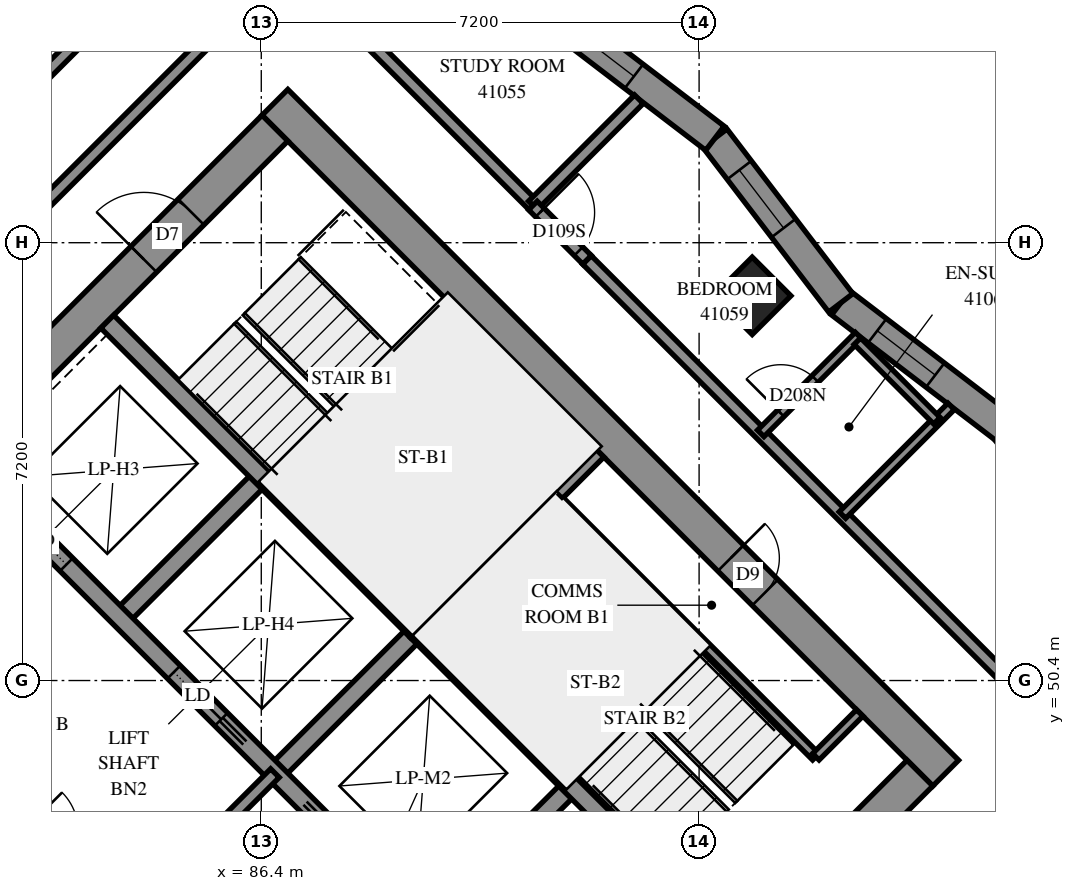
"""IFC4 building model, lengths in metres.
Left out: names, types, materials, properties, quantities, classifications, styles, units other than length and angle.
Written with IfcOpenShell. Run it as: python <this file> out.ifc"""

import sys

from ifc_helpers import new_model, si_unit, direction, frame, frame_2d, origin, origin_2d, place, context, subcontext, project, spatial, polyline, rectangle, outline, extrude, element, fill, save


model = new_model("IFC4")
c1 = context("Model", 3, precision=1e-05, world=origin(), true_north=direction((0.0, 1.0)))
c2 = subcontext(c1, "Body", "Model", "MODEL_VIEW")
j1 = project(units=[si_unit("LENGTHUNIT", "METRE"), si_unit("PLANEANGLEUNIT", "RADIAN")], contexts=[c1])
p1 = place(None, origin())
s1 = spatial("IfcSite", under=j1, at=p1, CompositionType="ELEMENT")
p2 = place(p1, origin())
s2 = spatial("IfcBuilding", under=s1, at=p2, CompositionType="ELEMENT")
p3 = place(p2, frame((0.0, 0.0, 152.4)))
s3 = spatial("IfcBuildingStorey", under=s2, at=p3, CompositionType="ELEMENT", Elevation=152.4)
p4 = place(p3, frame((94.474, 56.727, 0.0), z_axis=(0.0, 0.0, 1.0), x_axis=(0.7071067812, -0.7071067812, 0.0)))
e1 = element("IfcColumn", 1, at=p4, inside=s3, PredefinedType="COLUMN", context=c2, shape_type="SweptSolid", body=[
    extrude(rectangle(XDim=0.9, YDim=0.9, at=origin_2d()), origin(), (0.0, 0.0, 1.0), 3.1),
])
p5 = place(p3, frame((76.018, 49.302, -0.3), z_axis=(0.0, 0.0, 1.0), x_axis=(0.7071067812, -0.7071067812, 0.0)))
e2 = element("IfcWall", 2, at=p5, inside=s3, PredefinedType="SHEAR", context=c2, shape_type="SweptSolid", body=[
    extrude(rectangle(XDim=15.6, YDim=0.6, at=frame_2d((7.8, 0.0))), origin(), (0.0, 0.0, 1.0), 2.7),
])
p6 = place(p3, frame((86.625, 59.908, -0.3), z_axis=(0.0, 0.0, 1.0), x_axis=(0.7071067812, -0.7071067812, 0.0)))
e3 = element("IfcWall", 3, at=p6, inside=s3, PredefinedType="SHEAR", context=c2, shape_type="SweptSolid", body=[
    extrude(rectangle(XDim=15.6, YDim=0.6, at=frame_2d((7.8, 0.0))), origin(), (0.0, 0.0, 1.0), 2.7),
])
p7 = place(p6, frame((10.6, 0.0, 0.3)))
e4 = element("IfcOpeningElement", 4, at=p7, cuts=e3, PredefinedType="OPENING", context=c2, shape_type="SweptSolid", body=[
    extrude(rectangle(XDim=0.8, YDim=2.1, at=frame_2d((0.4, 1.05))), frame((0.0, 0.31, 0.0), z_axis=(0.0, -1.0, 0.0), x_axis=(1.0, 0.0, 0.0)), (0.0, 0.0, 1.0), 0.62),
])
p8 = place(p3, frame((76.442, 49.302, -0.3), z_axis=(0.0, 0.0, 1.0), x_axis=(0.7071067812, 0.7071067812, 0.0)))
e5 = element("IfcWall", 5, at=p8, inside=s3, PredefinedType="SHEAR", context=c2, shape_type="SweptSolid", body=[
    extrude(rectangle(XDim=14.4, YDim=0.6, at=frame_2d((7.2, 0.0))), origin(), (0.0, 0.0, 1.0), 2.7),
])
p9 = place(p8, frame((4.55, 0.0, 0.3)))
e6 = element("IfcOpeningElement", 6, at=p9, cuts=e5, PredefinedType="OPENING", context=c2, shape_type="SweptSolid", body=[
    extrude(rectangle(XDim=1.1, YDim=2.1, at=frame_2d((0.55, 1.05))), frame((0.0, 0.31, 0.0), z_axis=(0.0, -1.0, 0.0), x_axis=(1.0, 0.0, 0.0)), (0.0, 0.0, 1.0), 0.62),
])
p10 = place(p8, frame((11.35, 0.0, 0.3)))
e7 = element("IfcOpeningElement", 7, at=p10, cuts=e5, PredefinedType="OPENING", context=c2, shape_type="SweptSolid", body=[
    extrude(rectangle(XDim=1.1, YDim=2.1, at=frame_2d((0.55, 1.05))), frame((0.0, 0.31, 0.0), z_axis=(0.0, -1.0, 0.0), x_axis=(1.0, 0.0, 0.0)), (0.0, 0.0, 1.0), 0.62),
])
p11 = place(p3, frame((87.049, 38.695, -0.3), z_axis=(0.0, 0.0, 1.0), x_axis=(0.7071067812, 0.7071067812, 0.0)))
e8 = element("IfcWall", 8, at=p11, inside=s3, PredefinedType="SHEAR", context=c2, shape_type="SweptSolid", body=[
    extrude(rectangle(XDim=14.4, YDim=0.6, at=frame_2d((7.2, 0.0))), origin(), (0.0, 0.0, 1.0), 2.7),
])
p12 = place(p11, frame((4.55, 0.0, 0.3)))
e9 = element("IfcOpeningElement", 9, at=p12, cuts=e8, PredefinedType="OPENING", context=c2, shape_type="SweptSolid", body=[
    extrude(rectangle(XDim=1.1, YDim=2.1, at=frame_2d((0.55, 1.05))), frame((0.0, 0.31, 0.0), z_axis=(0.0, -1.0, 0.0), x_axis=(1.0, 0.0, 0.0)), (0.0, 0.0, 1.0), 0.62),
])
p13 = place(p11, frame((11.35, 0.0, 0.3)))
e10 = element("IfcOpeningElement", 10, at=p13, cuts=e8, PredefinedType="OPENING", context=c2, shape_type="SweptSolid", body=[
    extrude(rectangle(XDim=1.1, YDim=2.1, at=frame_2d((0.55, 1.05))), frame((0.0, 0.31, 0.0), z_axis=(0.0, -1.0, 0.0), x_axis=(1.0, 0.0, 0.0)), (0.0, 0.0, 1.0), 0.62),
])
p14 = place(p3, frame((84.079, 51.423, 0.0), z_axis=(0.0, 0.0, 1.0), x_axis=(0.7071219326, 0.7070916295, 0.0)))
e11 = element("IfcWall", 11, at=p14, inside=s3, PredefinedType="SOLIDWALL", context=c2, shape_type="SweptSolid", body=[
    extrude(rectangle(XDim=3.3, YDim=0.3, at=frame_2d((1.65, 0.0))), origin(), (0.0, 0.0, 1.0), 3.1),
])
for number, where, z_axis, x_axis in (
    (12, (86.625, 48.878, 0.0), (0.0, 0.0, 1.0), (0.707, 0.707, 0.0)),
    (13, (89.17, 46.332, 0.0), (0.0, 0.0, 1.0), (0.707, 0.707, 0.0)),
):
    element("IfcWall", number, at=place(p3, frame(where, z_axis=z_axis, x_axis=x_axis)), inside=s3, PredefinedType="SOLIDWALL", context=c2, shape_type="SweptSolid", body=[
        extrude(rectangle(XDim=3.3, YDim=0.3, at=frame_2d((1.65, 0.0))), origin(), (0.0, 0.0, 1.0), 3.1),
    ])
p15 = place(p3, frame((78.988, 51.423, 0.0), z_axis=(0.0, 0.0, 1.0), x_axis=(0.7071067812, -0.7071067812, 0.0)))
e14 = element("IfcWall", 14, at=p15, inside=s3, PredefinedType="SOLIDWALL", context=c2, shape_type="SweptSolid", body=[
    extrude(rectangle(XDim=14.4, YDim=0.3, at=frame_2d((7.2, 0.0))), origin(), (0.0, 0.0, 1.0), 3.1),
])
p16 = place(p15, frame((1.35, 0.0, 0.0)))
e15 = element("IfcOpeningElement", 15, at=p16, cuts=e14, PredefinedType="OPENING", context=c2, shape_type="SweptSolid", body=[
    extrude(rectangle(XDim=0.9, YDim=2.1, at=frame_2d((0.45, 1.05))), frame((0.0, 0.16, 0.0), z_axis=(0.0, -1.0, 0.0), x_axis=(1.0, 0.0, 0.0)), (0.0, 0.0, 1.0), 0.32),
])
p17 = place(p15, frame((4.95, 0.0, 0.0)))
e16 = element("IfcOpeningElement", 16, at=p17, cuts=e14, PredefinedType="OPENING", context=c2, shape_type="SweptSolid", body=[
    extrude(rectangle(XDim=0.9, YDim=2.1, at=frame_2d((0.45, 1.05))), frame((0.0, 0.16, 0.0), z_axis=(0.0, -1.0, 0.0), x_axis=(1.0, 0.0, 0.0)), (0.0, 0.0, 1.0), 0.32),
])
p18 = place(p15, frame((8.55, 0.0, 0.0)))
e17 = element("IfcOpeningElement", 17, at=p18, cuts=e14, PredefinedType="OPENING", context=c2, shape_type="SweptSolid", body=[
    extrude(rectangle(XDim=0.9, YDim=2.1, at=frame_2d((0.45, 1.05))), frame((0.0, 0.16, 0.0), z_axis=(0.0, -1.0, 0.0), x_axis=(1.0, 0.0, 0.0)), (0.0, 0.0, 1.0), 0.32),
])
p19 = place(p15, frame((12.05, 0.0, 0.0)))
e18 = element("IfcOpeningElement", 18, at=p19, cuts=e14, PredefinedType="OPENING", context=c2, shape_type="SweptSolid", body=[
    extrude(rectangle(XDim=1.1, YDim=2.1, at=frame_2d((0.55, 1.05))), frame((0.0, 0.16, 0.0), z_axis=(0.0, -1.0, 0.0), x_axis=(1.0, 0.0, 0.0)), (0.0, 0.0, 1.0), 0.32),
])
p20 = place(p3, frame((81.534, 53.969, 0.0), z_axis=(0.0, 0.0, 1.0), x_axis=(0.707103309, -0.7071102534, 0.0)))
e19 = element("IfcWall", 19, at=p20, inside=s3, PredefinedType="SOLIDWALL", context=c2, shape_type="SweptSolid", body=[
    extrude(rectangle(XDim=14.4, YDim=0.3, at=frame_2d((7.2, 0.0))), origin(), (0.0, 0.0, 1.0), 3.1),
])
p21 = place(p20, frame((1.25, 0.0, 0.0)))
e20 = element("IfcOpeningElement", 20, at=p21, cuts=e19, PredefinedType="OPENING", context=c2, shape_type="SweptSolid", body=[
    extrude(rectangle(XDim=1.1, YDim=2.1, at=frame_2d((0.55, 1.05))), frame((0.0, 0.16, 0.0), z_axis=(0.0, -1.0, 0.0), x_axis=(1.0, 0.0, 0.0)), (0.0, 0.0, 1.0), 0.32),
])
p22 = place(p20, frame((4.85, 0.0, 0.0)))
e21 = element("IfcOpeningElement", 21, at=p22, cuts=e19, PredefinedType="OPENING", context=c2, shape_type="SweptSolid", body=[
    extrude(rectangle(XDim=1.1, YDim=2.1, at=frame_2d((0.55, 1.05))), frame((0.0, 0.16, 0.0), z_axis=(0.0, -1.0, 0.0), x_axis=(1.0, 0.0, 0.0)), (0.0, 0.0, 1.0), 0.32),
])
p23 = place(p20, frame((8.45, 0.0, 0.0)))
e22 = element("IfcOpeningElement", 22, at=p23, cuts=e19, PredefinedType="OPENING", context=c2, shape_type="SweptSolid", body=[
    extrude(rectangle(XDim=1.1, YDim=2.1, at=frame_2d((0.55, 1.05))), frame((0.0, 0.16, 0.0), z_axis=(0.0, -1.0, 0.0), x_axis=(1.0, 0.0, 0.0)), (0.0, 0.0, 1.0), 0.32),
])
p24 = place(p20, frame((12.05, 0.0, 0.0)))
e23 = element("IfcOpeningElement", 23, at=p24, cuts=e19, PredefinedType="OPENING", context=c2, shape_type="SweptSolid", body=[
    extrude(rectangle(XDim=1.1, YDim=2.1, at=frame_2d((0.55, 1.05))), frame((0.0, 0.16, 0.0), z_axis=(0.0, -1.0, 0.0), x_axis=(1.0, 0.0, 0.0)), (0.0, 0.0, 1.0), 0.32),
])
for number, where, z_axis, x_axis in (
    (24, (83.867, 56.302, 0.0), (0.0, 0.0, 1.0), (0.707, -0.707, 0.0)),
    (25, (88.958, 51.211, 0.0), (0.0, 0.0, 1.0), (0.707, -0.707, 0.0)),
):
    element("IfcWall", number, at=place(p3, frame(where, z_axis=z_axis, x_axis=x_axis)), inside=s3, PredefinedType="SOLIDWALL", context=c2, shape_type="SweptSolid", body=[
        extrude(rectangle(XDim=7.2, YDim=0.3, at=frame_2d((3.6, 0.0))), origin(), (0.0, 0.0, 1.0), 3.1),
    ])
p25 = place(p3, frame((88.958, 51.211, 0.0), z_axis=(0.0, 0.0, 1.0), x_axis=(0.7071067812, 0.7071067812, 0.0)))
e26 = element("IfcWall", 26, at=p25, inside=s3, PredefinedType="SOLIDWALL", context=c2, shape_type="SweptSolid", body=[
    extrude(rectangle(XDim=4.2, YDim=0.3, at=frame_2d((2.1, 0.0))), origin(), (0.0, 0.0, 1.0), 3.1),
])
p26 = place(p3, frame((100.707, 51.834, 0.0), z_axis=(0.0, 0.0, 1.0), x_axis=(-0.6073041389, 0.7944694348, 0.0)))
e27 = element("IfcWall", 27, at=p26, inside=s3, PredefinedType="SOLIDWALL", context=c2, shape_type="SweptSolid", body=[
    extrude(outline(polyline([(0.033, -0.25), (3.441, -0.25), (3.374, 0.25), (-0.033, 0.25), (0.033, -0.25)])), origin(), (0.0, 0.0, 1.0), 3.1),
])
p27 = place(p26, frame((1.324, 0.0, 0.45)))
e28 = element("IfcOpeningElement", 28, at=p27, cuts=e27, PredefinedType="OPENING", context=c2, shape_type="SweptSolid", body=[
    extrude(rectangle(XDim=1.2, YDim=2.5, at=frame_2d((0.6, 1.25))), frame((0.0, 0.26, 0.0), z_axis=(0.0, -1.0, 0.0), x_axis=(1.0, 0.0, 0.0)), (0.0, 0.0, 1.0), 0.52),
])
p28 = place(p3, frame((98.637, 54.541, 0.0), z_axis=(0.0, 0.0, 1.0), x_axis=(-0.7944694348, 0.6073041389, 0.0)))
e29 = element("IfcWall", 29, at=p28, inside=s3, PredefinedType="SOLIDWALL", context=c2, shape_type="SweptSolid", body=[
    extrude(outline(polyline([(-0.033, -0.25), (3.374, -0.25), (3.441, 0.25), (0.033, 0.25), (-0.033, -0.25)])), origin(), (0.0, 0.0, 1.0), 3.1),
])
p29 = place(p28, frame((1.452, 0.0, 0.45)))
e30 = element("IfcOpeningElement", 30, at=p29, cuts=e29, PredefinedType="OPENING", context=c2, shape_type="SweptSolid", body=[
    extrude(rectangle(XDim=1.2, YDim=2.5, at=frame_2d((0.6, 1.25))), frame((0.0, 0.26, 0.0), z_axis=(0.0, -1.0, 0.0), x_axis=(1.0, 0.0, 0.0)), (0.0, 0.0, 1.0), 0.52),
])
p30 = place(p3, frame((95.93, 56.611, 0.0), z_axis=(0.0, 0.0, 1.0), x_axis=(-0.6073041389, 0.7944694348, 0.0)))
e31 = element("IfcWall", 31, at=p30, inside=s3, PredefinedType="SOLIDWALL", context=c2, shape_type="SweptSolid", body=[
    extrude(outline(polyline([(0.033, -0.25), (3.441, -0.25), (3.374, 0.25), (-0.033, 0.25), (0.033, -0.25)])), origin(), (0.0, 0.0, 1.0), 3.1),
])
p31 = place(p30, frame((1.548, 0.0, 0.45)))
e32 = element("IfcOpeningElement", 32, at=p31, cuts=e31, PredefinedType="OPENING", context=c2, shape_type="SweptSolid", body=[
    extrude(rectangle(XDim=1.2, YDim=2.5, at=frame_2d((0.6, 1.25))), frame((0.0, 0.26, 0.0), z_axis=(0.0, -1.0, 0.0), x_axis=(1.0, 0.0, 0.0)), (0.0, 0.0, 1.0), 0.52),
])
p32 = place(p3, frame((93.86, 59.318, 0.0), z_axis=(0.0, 0.0, 1.0), x_axis=(-0.7944694348, 0.6073041389, 0.0)))
e33 = element("IfcWall", 33, at=p32, inside=s3, PredefinedType="SOLIDWALL", context=c2, shape_type="SweptSolid", body=[
    extrude(outline(polyline([(-0.033, -0.25), (3.374, -0.25), (3.441, 0.25), (0.033, 0.25), (-0.033, -0.25)])), origin(), (0.0, 0.0, 1.0), 3.1),
])
p33 = place(p32, frame((1.677, 0.0, 0.45)))
e34 = element("IfcOpeningElement", 34, at=p33, cuts=e33, PredefinedType="OPENING", context=c2, shape_type="SweptSolid", body=[
    extrude(rectangle(XDim=1.2, YDim=2.5, at=frame_2d((0.6, 1.25))), frame((0.0, 0.26, 0.0), z_axis=(0.0, -1.0, 0.0), x_axis=(1.0, 0.0, 0.0)), (0.0, 0.0, 1.0), 0.52),
])
p34 = place(p3, frame((91.313, 53.354, 0.0), z_axis=(0.0, 0.0, 1.0), x_axis=(0.7071067812, -0.7071067812, 0.0)))
e35 = element("IfcWall", 35, at=p34, inside=s3, PredefinedType="PARTITIONING", context=c2, shape_type="SweptSolid", body=[
    extrude(rectangle(XDim=5.95, YDim=0.15, at=frame_2d((2.975, 0.0))), origin(), (0.0, 0.0, 1.0), 3.1),
])
p35 = place(p3, frame((95.52, 49.146, 0.0), z_axis=(0.0, 0.0, 1.0), x_axis=(0.7071067812, 0.7071067812, 0.0)))
e36 = element("IfcWall", 36, at=p35, inside=s3, PredefinedType="PARTITIONING", context=c2, shape_type="SweptSolid", body=[
    extrude(rectangle(XDim=1.02, YDim=0.15, at=frame_2d((0.51, 0.0))), origin(), (0.0, 0.0, 1.0), 3.1),
])
p36 = place(p3, frame((84.079, 46.332, 0.0), z_axis=(0.0, 0.0, 1.0), x_axis=(0.7071067812, 0.7071067812, 0.0)))
e37 = element("IfcWall", 37, at=p36, inside=s3, PredefinedType="PARTITIONING", context=c2, shape_type="SweptSolid", body=[
    extrude(rectangle(XDim=3.6, YDim=0.2, at=frame_2d((1.8, 0.0))), origin(), (0.0, 0.0, 1.0), 3.1),
])
p37 = place(p3, frame((91.755, 57.317, 0.0), z_axis=(0.0, 0.0, 1.0), x_axis=(0.7071067812, -0.7071067812, 0.0)))
e38 = element("IfcWall", 38, at=p37, inside=s3, PredefinedType="PARTITIONING", context=c2, shape_type="SweptSolid", body=[
    extrude(rectangle(XDim=11.639, YDim=0.2, at=frame_2d((5.819, 0.0))), origin(), (0.0, 0.0, 1.0), 3.1),
])
p38 = place(p3, frame((95.25, 42.232, 0.0), z_axis=(0.0, 0.0, 1.0), x_axis=(0.7071114163, 0.707102146, 0.0)))
e39 = element("IfcWall", 39, at=p38, inside=s3, PredefinedType="PARTITIONING", context=c2, shape_type="SweptSolid", body=[
    extrude(rectangle(XDim=10.787, YDim=0.2, at=frame_2d((5.394, 0.0))), origin(), (0.0, 0.0, 1.0), 3.1),
])
p39 = place(p3, frame((80.899, 58.427, 0.0), z_axis=(0.0, 0.0, 1.0), x_axis=(0.7071121545, 0.7071014078, 0.0)))
e40 = element("IfcWall", 40, at=p39, inside=s3, PredefinedType="PARTITIONING", context=c2, shape_type="SweptSolid", body=[
    extrude(rectangle(XDim=9.305, YDim=0.2, at=frame_2d((4.653, 0.0))), origin(), (0.0, 0.0, 1.0), 3.1),
])
p40 = place(p3, frame((94.19, 43.292, 0.0), z_axis=(0.0, 0.0, 1.0), x_axis=(0.7071067812, 0.7071067812, 0.0)))
e41 = element("IfcWall", 41, at=p40, inside=s3, PredefinedType="PARTITIONING", context=c2, shape_type="SweptSolid", body=[
    extrude(rectangle(XDim=8.2, YDim=0.2, at=frame_2d((4.1, 0.0))), origin(), (0.0, 0.0, 1.0), 3.1),
])
p41 = place(p40, frame((0.251, 0.0, 0.0)))
e42 = element("IfcOpeningElement", 42, at=p41, cuts=e41, PredefinedType="OPENING", context=c2, shape_type="SweptSolid", body=[
    extrude(rectangle(XDim=1.0, YDim=2.1, at=frame_2d((0.5, 1.05))), frame((0.0, 0.11, 0.0), z_axis=(0.0, -1.0, 0.0), x_axis=(1.0, 0.0, 0.0)), (0.0, 0.0, 1.0), 0.22),
])
p42 = place(p3, frame((81.038, 56.444, 0.0), z_axis=(0.0, 0.0, 1.0), x_axis=(0.7071067812, 0.7071067812, 0.0)))
e43 = element("IfcWall", 43, at=p42, inside=s3, PredefinedType="PARTITIONING", context=c2, shape_type="SweptSolid", body=[
    extrude(rectangle(XDim=8.2, YDim=0.2, at=frame_2d((4.1, 0.0))), origin(), (0.0, 0.0, 1.0), 3.1),
])
p43 = place(p42, frame((0.66, 0.0, 0.0)))
e44 = element("IfcOpeningElement", 44, at=p43, cuts=e43, PredefinedType="OPENING", context=c2, shape_type="SweptSolid", body=[
    extrude(rectangle(XDim=1.0, YDim=2.1, at=frame_2d((0.5, 1.05))), frame((0.0, 0.11, 0.0), z_axis=(0.0, -1.0, 0.0), x_axis=(1.0, 0.0, 0.0)), (0.0, 0.0, 1.0), 0.22),
])
p44 = place(p3, frame((86.841, 62.245, 0.0), z_axis=(0.0, 0.0, 1.0), x_axis=(0.7071067812, -0.7071067812, 0.0)))
e45 = element("IfcWall", 45, at=p44, inside=s3, PredefinedType="PARTITIONING", context=c2, shape_type="SweptSolid", body=[
    extrude(rectangle(XDim=5.699, YDim=0.2, at=frame_2d((2.85, 0.0))), origin(), (0.0, 0.0, 1.0), 3.1),
])
p45 = place(p3, frame((95.957, 53.121, 0.0), z_axis=(0.0, 0.0, 1.0), x_axis=(0.7071067812, 0.7071067812, 0.0)))
e46 = element("IfcWall", 46, at=p45, inside=s3, PredefinedType="PARTITIONING", context=c2, shape_type="SweptSolid", body=[
    extrude(rectangle(XDim=2.528, YDim=0.15, at=frame_2d((1.264, 0.0))), origin(), (0.0, 0.0, 1.0), 3.1),
])
p46 = place(p3, frame((90.867, 58.213, 0.0), z_axis=(0.0, 0.0, 1.0), x_axis=(0.7066202121, 0.7075930157, 0.0)))
e47 = element("IfcWall", 47, at=p46, inside=s3, PredefinedType="PARTITIONING", context=c2, shape_type="SweptSolid", body=[
    extrude(rectangle(XDim=2.467, YDim=0.2, at=frame_2d((1.234, 0.0))), origin(), (0.0, 0.0, 1.0), 3.1),
])
p47 = place(p3, frame((94.614, 54.464, 0.0), z_axis=(0.0, 0.0, 1.0), x_axis=(0.7071067812, 0.7071067812, 0.0)))
e48 = element("IfcWall", 48, at=p47, inside=s3, PredefinedType="PARTITIONING", context=c2, shape_type="SweptSolid", body=[
    extrude(rectangle(XDim=2.275, YDim=0.15, at=frame_2d((1.137, 0.0))), origin(), (0.0, 0.0, 1.0), 3.1),
])
p48 = place(p47, frame((0.466, 0.0, 0.0)))
e49 = element("IfcOpeningElement", 49, at=p48, cuts=e48, PredefinedType="OPENING", context=c2, shape_type="SweptSolid", body=[
    extrude(rectangle(XDim=0.8, YDim=2.1, at=frame_2d((0.4, 1.05))), frame((0.0, 0.085, 0.0), z_axis=(0.0, -1.0, 0.0), x_axis=(1.0, 0.0, 0.0)), (0.0, 0.0, 1.0), 0.17),
])
p49 = place(p3, frame((96.203, 55.981, 0.0), z_axis=(0.0, 0.0, 1.0), x_axis=(0.7071067812, -0.7071067812, 0.0)))
e50 = element("IfcWall", 50, at=p49, inside=s3, PredefinedType="PARTITIONING", context=c2, shape_type="SweptSolid", body=[
    extrude(rectangle(XDim=1.85, YDim=0.15, at=frame_2d((0.925, 0.0))), origin(), (0.0, 0.0, 1.0), 3.1),
])
p50 = place(p3, frame((90.867, 58.211, 0.0), z_axis=(0.0, 0.0, 1.0), x_axis=(0.706312726, -0.7078999456, 0.0)))
e51 = element("IfcWall", 51, at=p50, inside=s3, PredefinedType="PARTITIONING", context=c2, shape_type="SweptSolid", body=[
    extrude(rectangle(XDim=1.26, YDim=0.2, at=frame_2d((0.63, 0.0))), origin(), (0.0, 0.0, 1.0), 3.1),
])
p51 = place(p50, frame((0.162, 0.0, 0.0)))
e52 = element("IfcOpeningElement", 52, at=p51, cuts=e51, PredefinedType="OPENING", context=c2, shape_type="SweptSolid", body=[
    extrude(rectangle(XDim=0.9, YDim=2.1, at=frame_2d((0.45, 1.05))), frame((0.0, 0.11, 0.0), z_axis=(0.0, -1.0, 0.0), x_axis=(1.0, 0.0, 0.0)), (0.0, 0.0, 1.0), 0.22),
])
p52 = place(p29, origin())
e53 = element("IfcWindow", 53, at=p52, inside=s3, PartitioningType="SINGLE_PANEL", PredefinedType="WINDOW", context=c2, shape_type="SweptSolid", body=[
    extrude(rectangle(XDim=1.2, YDim=2.5, at=frame_2d((0.6, 1.25))), frame((0.0, 0.18, 0.0), z_axis=(0.0, -1.0, 0.0), x_axis=(1.0, 0.0, 0.0)), (0.0, 0.0, 1.0), 0.06),
])
fill(e30, e53)
p53 = place(p31, origin())
e54 = element("IfcWindow", 54, at=p53, inside=s3, PartitioningType="SINGLE_PANEL", PredefinedType="WINDOW", context=c2, shape_type="SweptSolid", body=[
    extrude(rectangle(XDim=1.2, YDim=2.5, at=frame_2d((0.6, 1.25))), frame((0.0, 0.18, 0.0), z_axis=(0.0, -1.0, 0.0), x_axis=(1.0, 0.0, 0.0)), (0.0, 0.0, 1.0), 0.06),
])
fill(e32, e54)
p54 = place(p33, origin())
e55 = element("IfcWindow", 55, at=p54, inside=s3, PartitioningType="SINGLE_PANEL", PredefinedType="WINDOW", context=c2, shape_type="SweptSolid", body=[
    extrude(rectangle(XDim=1.2, YDim=2.5, at=frame_2d((0.6, 1.25))), frame((0.0, 0.18, 0.0), z_axis=(0.0, -1.0, 0.0), x_axis=(1.0, 0.0, 0.0)), (0.0, 0.0, 1.0), 0.06),
])
fill(e34, e55)
p55 = place(p7, origin())
e56 = element("IfcDoor", 56, at=p55, inside=s3, OperationType="SINGLE_SWING_RIGHT", PredefinedType="DOOR", context=c2, shape_type="SweptSolid", body=[
    extrude(rectangle(XDim=0.8, YDim=2.1, at=frame_2d((0.4, 1.05))), frame((0.0, 0.025, 0.0), z_axis=(0.0, -1.0, 0.0), x_axis=(1.0, 0.0, 0.0)), (0.0, 0.0, 1.0), 0.05),
])
fill(e4, e56)
p56 = place(p10, origin())
e57 = element("IfcDoor", 57, at=p56, inside=s3, OperationType="SINGLE_SWING_LEFT", PredefinedType="DOOR", context=c2, shape_type="SweptSolid", body=[
    extrude(rectangle(XDim=1.1, YDim=2.1, at=frame_2d((0.55, 1.05))), frame((0.0, 0.025, 0.0), z_axis=(0.0, -1.0, 0.0), x_axis=(1.0, 0.0, 0.0)), (0.0, 0.0, 1.0), 0.05),
])
fill(e7, e57)
p57 = place(p21, origin())
e58 = element("IfcDoor", 58, at=p57, inside=s3, OperationType="SLIDING_TO_LEFT", PredefinedType="DOOR", context=c2, shape_type="SweptSolid", body=[
    extrude(rectangle(XDim=1.1, YDim=2.1, at=frame_2d((0.55, 1.05))), frame((0.0, 0.025, 0.0), z_axis=(0.0, -1.0, 0.0), x_axis=(1.0, 0.0, 0.0)), (0.0, 0.0, 1.0), 0.05),
])
fill(e20, e58)
p58 = place(p22, origin())
e59 = element("IfcDoor", 59, at=p58, inside=s3, OperationType="SLIDING_TO_RIGHT", PredefinedType="DOOR", context=c2, shape_type="SweptSolid", body=[
    extrude(rectangle(XDim=1.1, YDim=2.1, at=frame_2d((0.55, 1.05))), frame((0.0, 0.025, 0.0), z_axis=(0.0, -1.0, 0.0), x_axis=(1.0, 0.0, 0.0)), (0.0, 0.0, 1.0), 0.05),
])
fill(e21, e59)
p59 = place(p51, origin())
e60 = element("IfcDoor", 60, at=p59, inside=s3, OperationType="SINGLE_SWING_RIGHT", PredefinedType="DOOR", context=c2, shape_type="SweptSolid", body=[
    extrude(rectangle(XDim=0.9, YDim=2.1, at=frame_2d((0.45, 1.05))), frame((0.0, 0.025, 0.0), z_axis=(0.0, -1.0, 0.0), x_axis=(1.0, 0.0, 0.0)), (0.0, 0.0, 1.0), 0.05),
])
fill(e52, e60)
p60 = place(p48, origin())
e61 = element("IfcDoor", 61, at=p60, inside=s3, OperationType="SINGLE_SWING_RIGHT", PredefinedType="DOOR", context=c2, shape_type="SweptSolid", body=[
    extrude(rectangle(XDim=0.8, YDim=2.1, at=frame_2d((0.4, 1.05))), frame((0.0, 0.025, 0.0), z_axis=(0.0, -1.0, 0.0), x_axis=(1.0, 0.0, 0.0)), (0.0, 0.0, 1.0), 0.05),
])
fill(e49, e61)
save(model, sys.argv[1])
